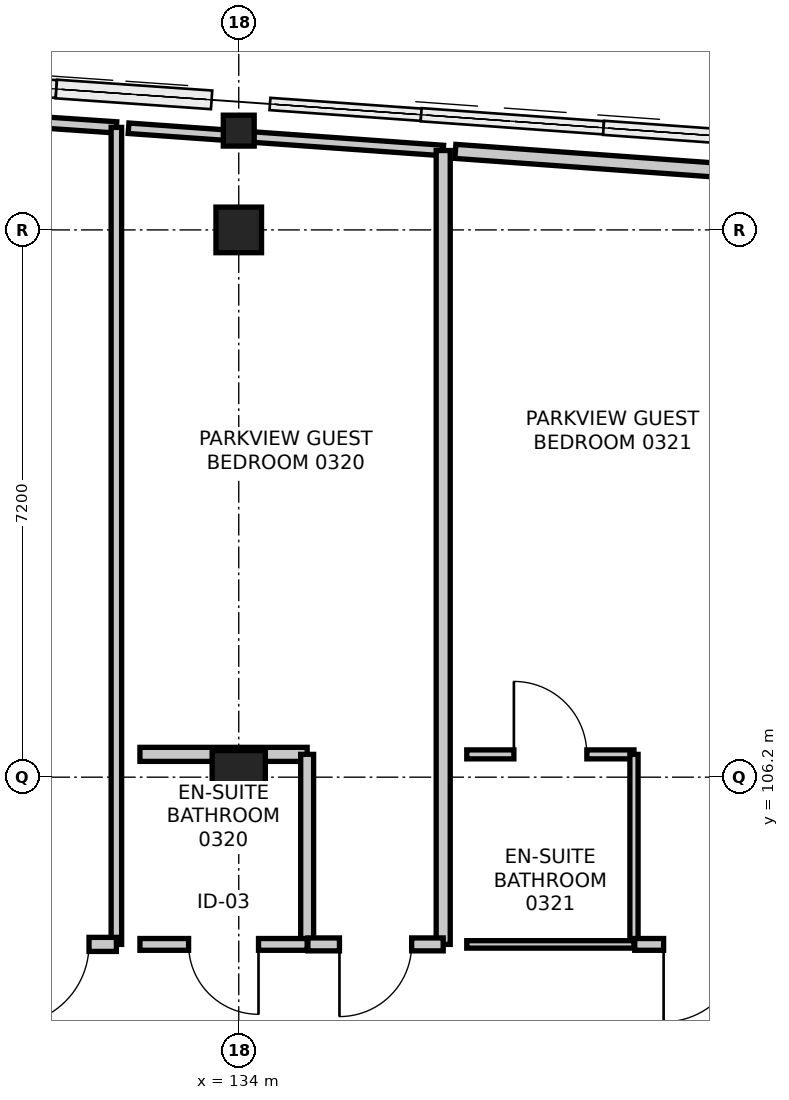
"""IFC4 building model, lengths in metres.
Left out: names, types, materials, properties, quantities, classifications, styles, units other than length and angle.
Written with IfcOpenShell. Run it as: python <this file> out.ifc"""

import sys

from ifc_helpers import new_model, si_unit, direction, frame, frame_2d, origin, origin_2d, place, context, subcontext, project, spatial, rectangle, hollow_circle, extrude, element, fill, save


model = new_model("IFC4")
c1 = context("Model", 3, precision=1e-05, world=origin(), true_north=direction((0.0, 1.0)))
c2 = subcontext(c1, "Body", "Model", "MODEL_VIEW")
j1 = project(units=[si_unit("LENGTHUNIT", "METRE"), si_unit("PLANEANGLEUNIT", "RADIAN")], contexts=[c1])
p1 = place(None, origin())
s1 = spatial("IfcSite", under=j1, at=p1, CompositionType="ELEMENT")
p2 = place(p1, origin())
s2 = spatial("IfcBuilding", under=s1, at=p2, CompositionType="ELEMENT")
p3 = place(p2, frame((0.0, 0.0, 15.0)))
s3 = spatial("IfcBuildingStorey", under=s2, at=p3, CompositionType="ELEMENT", Elevation=15.0)
p4 = place(p3, frame((134.0, 106.2, 0.0), z_axis=(0.0, 0.0, 1.0), x_axis=(1.0, 0.0, 0.0)))
e1 = element("IfcColumn", 1, at=p4, inside=s3, PredefinedType="COLUMN", context=c2, shape_type="SweptSolid", body=[
    extrude(rectangle(XDim=0.7, YDim=0.7, at=origin_2d()), origin(), (0.0, 0.0, 1.0), 4.2),
])
p5 = place(p3, frame((134.0, 113.4, 0.0), z_axis=(0.0, 0.0, 1.0), x_axis=(1.0, 0.0, 0.0)))
e2 = element("IfcColumn", 2, at=p5, inside=s3, PredefinedType="COLUMN", context=c2, shape_type="SweptSolid", body=[
    extrude(rectangle(XDim=0.6, YDim=0.6, at=origin_2d()), origin(), (0.0, 0.0, 1.0), 4.2),
])
p6 = place(p3, frame((134.0, 114.706, 0.0), z_axis=(0.0, 0.0, 1.0), x_axis=(1.0, 0.0, 0.0)))
e3 = element("IfcColumn", 3, at=p6, inside=s3, PredefinedType="COLUMN", context=c2, shape_type="SweptSolid", body=[
    extrude(hollow_circle(Radius=0.203, WallThickness=0.02, at=origin_2d()), origin(), (0.0, 0.0, 1.0), 4.2),
])
p7 = place(p3, frame((128.25, 115.029, 0.0), z_axis=(0.0, 0.0, 1.0), x_axis=(0.997708221266, -0.067663174763, 0.0)))
e4 = element("IfcWall", 4, at=p7, inside=s3, PredefinedType="PARTITIONING", context=c2, shape_type="SweptSolid", body=[
    extrude(rectangle(XDim=4.149, YDim=0.148, at=frame_2d((2.075, 0.0))), origin(), (0.0, 0.0, 1.0), 3.516),
])
p8 = place(p3, frame((132.39, 114.749, 0.0), z_axis=(0.0, 0.0, 1.0), x_axis=(0.0, -1.0, 0.0)))
e5 = element("IfcWall", 5, at=p8, inside=s3, PredefinedType="PARTITIONING", context=c2, shape_type="SweptSolid", body=[
    extrude(rectangle(XDim=10.749, YDim=0.138, at=frame_2d((5.374, 0.0))), origin(), (0.0, 0.0, 1.0), 3.325),
])
p9 = place(p3, frame((132.39, 104.0, 0.0), z_axis=(0.0, 0.0, 1.0), x_axis=(-1.0, 0.0, 0.0)))
e6 = element("IfcWall", 6, at=p9, inside=s3, PredefinedType="PARTITIONING", context=c2, shape_type="SweptSolid", body=[
    extrude(rectangle(XDim=1.78, YDim=0.185, at=frame_2d((0.89, 0.0))), origin(), (0.0, 0.0, 1.0), 3.94),
])
p10 = place(p9, frame((0.36, 0.0, 0.0)))
e7 = element("IfcOpeningElement", 7, at=p10, cuts=e6, PredefinedType="OPENING", context=c2, shape_type="SweptSolid", body=[
    extrude(rectangle(XDim=1.06, YDim=2.2, at=frame_2d((0.53, 1.1))), frame((0.0, 0.103, 0.0), z_axis=(0.0, -1.0, 0.0), x_axis=(1.0, 0.0, 0.0)), (0.0, 0.0, 1.0), 0.205),
])
p11 = place(p3, frame((132.7, 106.5, 0.0), z_axis=(0.0, 0.0, 1.0), x_axis=(1.0, 0.0, 0.0)))
e8 = element("IfcWall", 8, at=p11, inside=s3, PredefinedType="PARTITIONING", context=c2, shape_type="SweptSolid", body=[
    extrude(rectangle(XDim=2.2, YDim=0.185, at=frame_2d((1.1, 0.0))), origin(), (0.0, 0.0, 1.0), 3.275),
])
p12 = place(p3, frame((134.9, 106.5, 0.0), z_axis=(0.0, 0.0, 1.0), x_axis=(0.0, -1.0, 0.0)))
e9 = element("IfcWall", 9, at=p12, inside=s3, PredefinedType="PARTITIONING", context=c2, shape_type="SweptSolid", body=[
    extrude(rectangle(XDim=2.5, YDim=0.17, at=frame_2d((1.25, 0.0))), origin(), (0.0, 0.0, 1.0), 3.325),
])
p13 = place(p3, frame((134.9, 104.0, 0.0), z_axis=(0.0, 0.0, 1.0), x_axis=(-1.0, 0.0, 0.0)))
e10 = element("IfcWall", 10, at=p13, inside=s3, PredefinedType="PARTITIONING", context=c2, shape_type="SweptSolid", body=[
    extrude(rectangle(XDim=2.2, YDim=0.155, at=frame_2d((1.1, 0.0))), origin(), (0.0, 0.0, 1.0), 3.275),
])
p14 = place(p13, frame((0.64, 0.0, 0.0)))
e11 = element("IfcOpeningElement", 11, at=p14, cuts=e10, PredefinedType="OPENING", context=c2, shape_type="SweptSolid", body=[
    extrude(rectangle(XDim=0.92, YDim=2.1, at=frame_2d((0.46, 1.05))), frame((0.0, 0.087, 0.0), z_axis=(0.0, -1.0, 0.0), x_axis=(1.0, 0.0, 0.0)), (0.0, 0.0, 1.0), 0.175),
])
p15 = place(p3, frame((132.55, 114.737, 0.0), z_axis=(0.0, 0.0, 1.0), x_axis=(0.997505365192, -0.070590696363, 0.0)))
e12 = element("IfcWall", 12, at=p15, inside=s3, PredefinedType="PARTITIONING", context=c2, shape_type="SweptSolid", body=[
    extrude(rectangle(XDim=4.15, YDim=0.138, at=frame_2d((2.075, 0.0))), origin(), (0.0, 0.0, 1.0), 3.516),
])
p16 = place(p3, frame((136.69, 114.444, 0.0), z_axis=(0.0, 0.0, 1.0), x_axis=(0.0, -1.0, 0.0)))
e13 = element("IfcWall", 13, at=p16, inside=s3, PredefinedType="PARTITIONING", context=c2, shape_type="SweptSolid", body=[
    extrude(rectangle(XDim=10.444, YDim=0.185, at=frame_2d((5.222, 0.0))), origin(), (0.0, 0.0, 1.0), 3.325),
])
p17 = place(p3, frame((136.69, 104.0, 0.0), z_axis=(0.0, 0.0, 1.0), x_axis=(-1.0, 0.0, 0.0)))
e14 = element("IfcWall", 14, at=p17, inside=s3, PredefinedType="PARTITIONING", context=c2, shape_type="SweptSolid", body=[
    extrude(rectangle(XDim=1.78, YDim=0.17, at=frame_2d((0.89, 0.0))), origin(), (0.0, 0.0, 1.0), 3.94),
])
p18 = place(p17, frame((0.415, 0.0, 0.0)))
e15 = element("IfcOpeningElement", 15, at=p18, cuts=e14, PredefinedType="OPENING", context=c2, shape_type="SweptSolid", body=[
    extrude(rectangle(XDim=0.95, YDim=2.1, at=frame_2d((0.475, 1.05))), frame((0.0, 0.095, 0.0), z_axis=(0.0, -1.0, 0.0), x_axis=(1.0, 0.0, 0.0)), (0.0, 0.0, 1.0), 0.19),
])
p19 = place(p3, frame((137.0, 106.5, 0.0), z_axis=(0.0, 0.0, 1.0), x_axis=(1.0, 0.0, 0.0)))
e16 = element("IfcWall", 16, at=p19, inside=s3, PredefinedType="PARTITIONING", context=c2, shape_type="SweptSolid", body=[
    extrude(rectangle(XDim=2.2, YDim=0.118, at=frame_2d((1.1, 0.0))), origin(), (0.0, 0.0, 1.0), 3.94),
])
p20 = place(p19, frame((0.62, 0.0, 0.0)))
e17 = element("IfcOpeningElement", 17, at=p20, cuts=e16, PredefinedType="OPENING", context=c2, shape_type="SweptSolid", body=[
    extrude(rectangle(XDim=0.96, YDim=2.14, at=frame_2d((0.48, 1.07))), frame((0.0, 0.069, 0.0), z_axis=(0.0, -1.0, 0.0), x_axis=(1.0, 0.0, 0.0)), (0.0, 0.0, 1.0), 0.138),
])
p21 = place(p3, frame((139.2, 106.5, 0.0), z_axis=(0.0, 0.0, 1.0), x_axis=(0.0, -1.0, 0.0)))
e18 = element("IfcWall", 18, at=p21, inside=s3, PredefinedType="PARTITIONING", context=c2, shape_type="SweptSolid", body=[
    extrude(rectangle(XDim=2.5, YDim=0.108, at=frame_2d((1.25, 0.0))), origin(), (0.0, 0.0, 1.0), 3.325),
])
p22 = place(p3, frame((139.2, 104.0, 0.0), z_axis=(0.0, 0.0, 1.0), x_axis=(-1.0, 0.0, 0.0)))
e19 = element("IfcWall", 19, at=p22, inside=s3, PredefinedType="PARTITIONING", context=c2, shape_type="SweptSolid", body=[
    extrude(rectangle(XDim=2.2, YDim=0.098, at=frame_2d((1.1, 0.0))), origin(), (0.0, 0.0, 1.0), 3.94),
])
p23 = place(p3, frame((136.85, 114.433, 0.0), z_axis=(0.0, 0.0, 1.0), x_axis=(0.997442850046, -0.071468600743, 0.0)))
e20 = element("IfcWall", 20, at=p23, inside=s3, PredefinedType="PARTITIONING", context=c2, shape_type="SweptSolid", body=[
    extrude(rectangle(XDim=4.15, YDim=0.185, at=frame_2d((2.075, 0.0))), origin(), (0.0, 0.0, 1.0), 3.516),
])
p24 = place(p3, frame((140.99, 104.0, 0.0), z_axis=(0.0, 0.0, 1.0), x_axis=(-1.0, 0.0, 0.0)))
e21 = element("IfcWall", 21, at=p24, inside=s3, PredefinedType="PARTITIONING", context=c2, shape_type="SweptSolid", body=[
    extrude(rectangle(XDim=1.78, YDim=0.155, at=frame_2d((0.89, 0.0))), origin(), (0.0, 0.0, 1.0), 3.275),
])
p25 = place(p24, frame((0.38, 0.0, 0.0)))
e22 = element("IfcOpeningElement", 22, at=p25, cuts=e21, PredefinedType="OPENING", context=c2, shape_type="SweptSolid", body=[
    extrude(rectangle(XDim=1.02, YDim=2.15, at=frame_2d((0.51, 1.075))), frame((0.0, 0.087, 0.0), z_axis=(0.0, -1.0, 0.0), x_axis=(1.0, 0.0, 0.0)), (0.0, 0.0, 1.0), 0.175),
])
p26 = place(p10, origin())
e23 = element("IfcDoor", 23, at=p26, inside=s3, OperationType="SINGLE_SWING_RIGHT", PredefinedType="DOOR", context=c2, shape_type="SweptSolid", body=[
    extrude(rectangle(XDim=1.06, YDim=2.2, at=frame_2d((0.53, 1.1))), frame((0.0, 0.025, 0.0), z_axis=(0.0, -1.0, 0.0), x_axis=(1.0, 0.0, 0.0)), (0.0, 0.0, 1.0), 0.05),
])
fill(e7, e23)
p27 = place(p14, origin())
e24 = element("IfcDoor", 24, at=p27, inside=s3, OperationType="SINGLE_SWING_LEFT", PredefinedType="DOOR", context=c2, shape_type="SweptSolid", body=[
    extrude(rectangle(XDim=0.92, YDim=2.1, at=frame_2d((0.46, 1.05))), frame((0.0, 0.025, 0.0), z_axis=(0.0, -1.0, 0.0), x_axis=(1.0, 0.0, 0.0)), (0.0, 0.0, 1.0), 0.05),
])
fill(e11, e24)
p28 = place(p18, origin())
e25 = element("IfcDoor", 25, at=p28, inside=s3, OperationType="SINGLE_SWING_RIGHT", PredefinedType="DOOR", context=c2, shape_type="SweptSolid", body=[
    extrude(rectangle(XDim=0.95, YDim=2.1, at=frame_2d((0.475, 1.05))), frame((0.0, 0.025, 0.0), z_axis=(0.0, -1.0, 0.0), x_axis=(1.0, 0.0, 0.0)), (0.0, 0.0, 1.0), 0.05),
])
fill(e15, e25)
p29 = place(p20, origin())
e26 = element("IfcDoor", 26, at=p29, inside=s3, OperationType="SINGLE_SWING_LEFT", PredefinedType="DOOR", context=c2, shape_type="SweptSolid", body=[
    extrude(rectangle(XDim=0.96, YDim=2.14, at=frame_2d((0.48, 1.07))), frame((0.0, 0.025, 0.0), z_axis=(0.0, -1.0, 0.0), x_axis=(1.0, 0.0, 0.0)), (0.0, 0.0, 1.0), 0.05),
])
fill(e17, e26)
p30 = place(p25, origin())
e27 = element("IfcDoor", 27, at=p30, inside=s3, OperationType="SINGLE_SWING_RIGHT", PredefinedType="DOOR", context=c2, shape_type="SweptSolid", body=[
    extrude(rectangle(XDim=1.02, YDim=2.15, at=frame_2d((0.51, 1.075))), frame((0.0, 0.025, 0.0), z_axis=(0.0, -1.0, 0.0), x_axis=(1.0, 0.0, 0.0)), (0.0, 0.0, 1.0), 0.05),
])
fill(e22, e27)
save(model, sys.argv[1])
